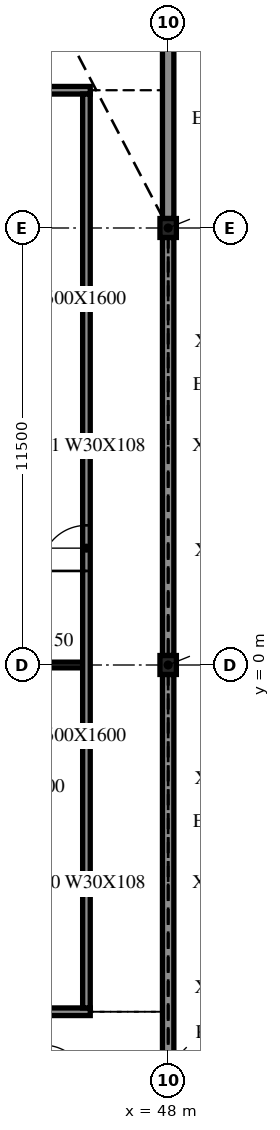
"""IFC4 building model, lengths in metres.
Left out: names, types, materials, properties, quantities, classifications, styles, units other than length and angle.
Written with IfcOpenShell. Run it as: python <this file> out.ifc"""

import sys

from ifc_helpers import new_model, si_unit, direction, frame, frame_2d, origin, origin_2d, place, context, subcontext, project, spatial, rectangle, i_section, extrude, element, fill, save


model = new_model("IFC4")
c1 = context("Model", 3, precision=1e-05, world=origin(), true_north=direction((0.0, 1.0)))
c2 = subcontext(c1, "Body", "Model", "MODEL_VIEW")
j1 = project(units=[si_unit("LENGTHUNIT", "METRE"), si_unit("PLANEANGLEUNIT", "RADIAN")], contexts=[c1])
p1 = place(None, origin())
s1 = spatial("IfcSite", under=j1, at=p1, CompositionType="ELEMENT")
p2 = place(p1, origin())
s2 = spatial("IfcBuilding", under=s1, at=p2, CompositionType="ELEMENT")
p3 = place(p2, frame((0.0, 0.0, 20.1)))
s3 = spatial("IfcBuildingStorey", under=s2, at=p3, CompositionType="ELEMENT", Elevation=20.1)
for number, where, z_axis, x_axis in (
    (1, (48.0, 0.0, -0.34), (0.0, 0.0, 1.0), (1.0, 0.0, 0.0)),
    (2, (48.0, 11.5, -0.34), (0.0, 0.0, 1.0), (1.0, 0.0, 0.0)),
):
    element("IfcColumn", number, at=place(p3, frame(where, z_axis=z_axis, x_axis=x_axis)), inside=s3, PredefinedType="COLUMN", context=c2, shape_type="SweptSolid", body=[
        extrude(i_section(OverallWidth=0.432, OverallDepth=0.498, WebThickness=0.056, FlangeThickness=0.089, at=origin_2d()), origin(), (0.0, 0.0, 1.0), 4.3),
    ])
for number, where, z_axis, x_axis in (
    (3, (48.0, -11.251, 0.0), (0.0, 0.0, 1.0), (0.0, 1.0, 0.0)),
    (4, (48.0, 0.249, 0.0), (0.0, 0.0, 1.0), (0.0, 1.0, 0.0)),
):
    element("IfcWall", number, at=place(p3, frame(where, z_axis=z_axis, x_axis=x_axis)), inside=s3, PredefinedType="NOTDEFINED", context=c2, shape_type="SweptSolid", body=[
        extrude(rectangle(XDim=11.002, YDim=0.3, at=frame_2d((5.501, 0.0))), origin(), (0.0, 0.0, 1.0), 3.203),
    ])
p4 = place(p3, frame((48.0, 11.749, 0.0), z_axis=(0.0, 0.0, 1.0), x_axis=(0.0, 1.0, 0.0)))
e5 = element("IfcWall", 5, at=p4, inside=s3, PredefinedType="NOTDEFINED", context=c2, shape_type="SweptSolid", body=[
    extrude(rectangle(XDim=5.251, YDim=0.3, at=frame_2d((2.625, 0.0))), origin(), (0.0, 0.0, 1.0), 3.203),
])
p5 = place(p3, frame((32.5, -9.125, 0.0), z_axis=(0.0, 0.0, 1.0), x_axis=(1.0, 0.0, 0.0)))
e6 = element("IfcWall", 6, at=p5, inside=s3, PredefinedType="PARTITIONING", context=c2, shape_type="SweptSolid", body=[
    extrude(rectangle(XDim=13.45, YDim=0.2, at=frame_2d((6.725, 0.0))), origin(), (0.0, 0.0, 1.0), 3.96),
])
p6 = place(p5, frame((5.1, 0.0, 0.0)))
e7 = element("IfcOpeningElement", 7, at=p6, cuts=e6, PredefinedType="OPENING", context=c2, shape_type="SweptSolid", body=[
    extrude(rectangle(XDim=1.2, YDim=2.1, at=frame_2d((0.6, 1.05))), frame((0.0, 0.11, 0.0), z_axis=(0.0, -1.0, 0.0), x_axis=(1.0, 0.0, 0.0)), (0.0, 0.0, 1.0), 0.22),
])
p7 = place(p5, frame((6.9, 0.0, 0.0)))
e8 = element("IfcOpeningElement", 8, at=p7, cuts=e6, PredefinedType="OPENING", context=c2, shape_type="SweptSolid", body=[
    extrude(rectangle(XDim=1.2, YDim=2.1, at=frame_2d((0.6, 1.05))), frame((0.0, 0.11, 0.0), z_axis=(0.0, -1.0, 0.0), x_axis=(1.0, 0.0, 0.0)), (0.0, 0.0, 1.0), 0.22),
])
p8 = place(p3, frame((42.8, 0.0, 0.0), z_axis=(0.0, 0.0, 1.0), x_axis=(1.0, 0.0, 0.0)))
e9 = element("IfcWall", 9, at=p8, inside=s3, PredefinedType="PARTITIONING", context=c2, shape_type="SweptSolid", body=[
    extrude(rectangle(XDim=2.95, YDim=0.15, at=frame_2d((1.475, 0.0))), origin(), (0.0, 0.0, 1.0), 3.96),
])
p9 = place(p3, frame((32.5, 15.125, 0.0), z_axis=(0.0, 0.0, 1.0), x_axis=(1.0, 0.0, 0.0)))
e10 = element("IfcWall", 10, at=p9, inside=s3, PredefinedType="PARTITIONING", context=c2, shape_type="SweptSolid", body=[
    extrude(rectangle(XDim=13.45, YDim=0.2, at=frame_2d((6.725, 0.0))), origin(), (0.0, 0.0, 1.0), 3.96),
])
p10 = place(p3, frame((45.85, -9.025, 0.0), z_axis=(0.0, 0.0, 1.0), x_axis=(0.0, 1.0, 0.0)))
e11 = element("IfcWall", 11, at=p10, inside=s3, PredefinedType="PARTITIONING", context=c2, shape_type="SweptSolid", body=[
    extrude(rectangle(XDim=24.05, YDim=0.2, at=frame_2d((12.025, 0.0))), origin(), (0.0, 0.0, 1.0), 3.96),
])
p11 = place(p10, frame((11.5, 0.0, 0.0)))
e12 = element("IfcOpeningElement", 12, at=p11, cuts=e11, PredefinedType="OPENING", context=c2, shape_type="SweptSolid", body=[
    extrude(rectangle(XDim=1.2, YDim=2.1, at=frame_2d((0.6, 1.05))), frame((0.0, 0.11, 0.0), z_axis=(0.0, -1.0, 0.0), x_axis=(1.0, 0.0, 0.0)), (0.0, 0.0, 1.0), 0.22),
])
p12 = place(p11, origin())
e13 = element("IfcDoor", 13, at=p12, inside=s3, OperationType="SINGLE_SWING_RIGHT", PredefinedType="DOOR", context=c2, shape_type="SweptSolid", body=[
    extrude(rectangle(XDim=1.2, YDim=2.1, at=frame_2d((0.6, 1.05))), frame((0.0, 0.025, 0.0), z_axis=(0.0, -1.0, 0.0), x_axis=(1.0, 0.0, 0.0)), (0.0, 0.0, 1.0), 0.05),
])
fill(e12, e13)
save(model, sys.argv[1])
